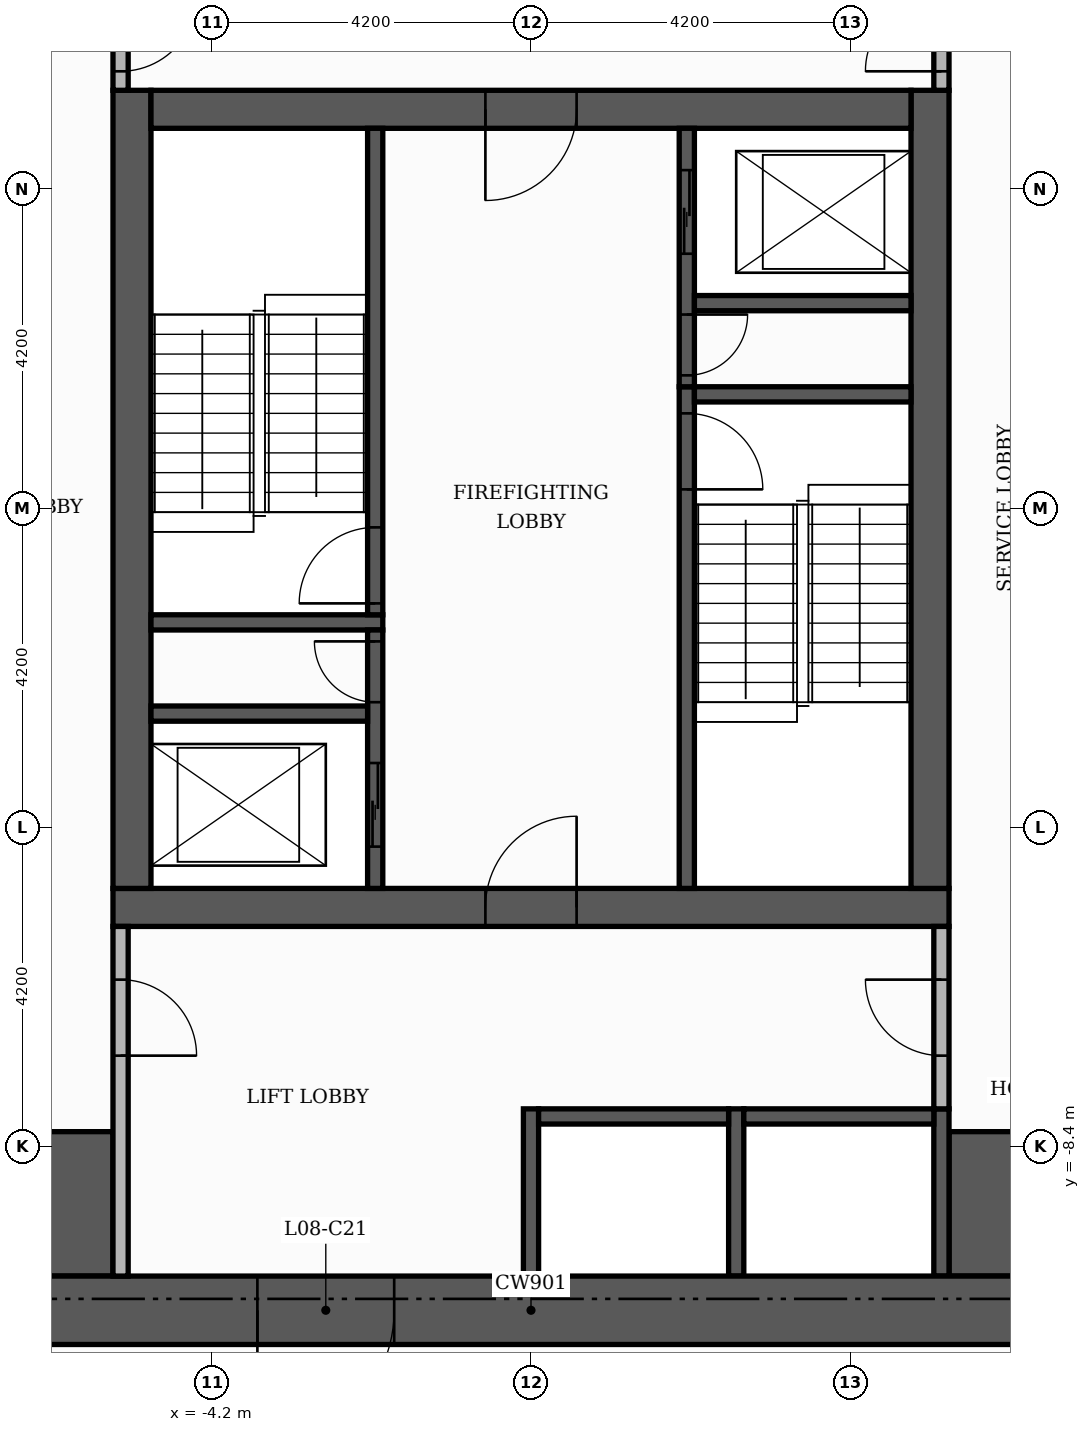
"""IFC4 building model, lengths in metres.
Left out: names, types, materials, properties, quantities, classifications, styles, units other than length and angle.
Written with IfcOpenShell. Run it as: python <this file> out.ifc"""

import sys

from ifc_helpers import new_model, si_unit, direction, frame, frame_2d, origin, place, context, subcontext, project, spatial, rectangle, extrude, element, fill, save


model = new_model("IFC4")
c1 = context("Model", 3, precision=1e-05, world=origin(), true_north=direction((0.0, 1.0)))
c2 = subcontext(c1, "Body", "Model", "MODEL_VIEW")
j1 = project(units=[si_unit("LENGTHUNIT", "METRE"), si_unit("PLANEANGLEUNIT", "RADIAN")], contexts=[c1])
p1 = place(None, origin())
s1 = spatial("IfcSite", under=j1, at=p1, CompositionType="ELEMENT")
p2 = place(p1, origin())
s2 = spatial("IfcBuilding", under=s1, at=p2, CompositionType="ELEMENT")
p3 = place(p2, frame((0.0, 0.0, 38.7)))
s3 = spatial("IfcBuildingStorey", under=s2, at=p3, CompositionType="ELEMENT", Elevation=38.7)
p4 = place(p3, frame((-5.5, -5.25, 0.0), z_axis=(0.0, 0.0, 1.0), x_axis=(1.0, 0.0, 0.0)))
e1 = element("IfcWall", 1, at=p4, inside=s3, PredefinedType="SHEAR", context=c2, shape_type="SweptSolid", body=[
    extrude(rectangle(XDim=11.0, YDim=0.5, at=frame_2d((5.5, 0.0))), origin(), (0.0, 0.0, 1.0), 3.48),
])
p5 = place(p4, frame((4.9, 0.0, 0.0)))
e2 = element("IfcOpeningElement", 2, at=p5, cuts=e1, PredefinedType="OPENING", context=c2, shape_type="SweptSolid", body=[
    extrude(rectangle(XDim=1.2, YDim=2.1, at=frame_2d((0.6, 1.05))), frame((0.0, 0.26, 0.0), z_axis=(0.0, -1.0, 0.0), x_axis=(1.0, 0.0, 0.0)), (0.0, 0.0, 1.0), 0.52),
])
for number, where, z_axis, x_axis in (
    (3, (-5.25, -5.0, 0.0), (0.0, 0.0, 1.0), (0.0, 1.0, 0.0)),
    (4, (5.25, -5.0, 0.0), (0.0, 0.0, 1.0), (0.0, 1.0, 0.0)),
):
    element("IfcWall", number, at=place(p3, frame(where, z_axis=z_axis, x_axis=x_axis)), inside=s3, PredefinedType="SHEAR", context=c2, shape_type="SweptSolid", body=[
        extrude(rectangle(XDim=10.5, YDim=0.5, at=frame_2d((5.25, 0.0))), origin(), (0.0, 0.0, 1.0), 3.48),
    ])
p6 = place(p3, frame((-5.0, 5.25, 0.0), z_axis=(0.0, 0.0, 1.0), x_axis=(1.0, 0.0, 0.0)))
e5 = element("IfcWall", 5, at=p6, inside=s3, PredefinedType="SHEAR", context=c2, shape_type="SweptSolid", body=[
    extrude(rectangle(XDim=10.0, YDim=0.5, at=frame_2d((5.0, 0.0))), origin(), (0.0, 0.0, 1.0), 3.48),
])
p7 = place(p6, frame((4.4, 0.0, 0.0)))
e6 = element("IfcOpeningElement", 6, at=p7, cuts=e5, PredefinedType="OPENING", context=c2, shape_type="SweptSolid", body=[
    extrude(rectangle(XDim=1.2, YDim=2.1, at=frame_2d((0.6, 1.05))), frame((0.0, 0.26, 0.0), z_axis=(0.0, -1.0, 0.0), x_axis=(1.0, 0.0, 0.0)), (0.0, 0.0, 1.0), 0.52),
])
for number, where, z_axis, x_axis in (
    (7, (-10.1, -9.15, 0.0), (0.0, 0.0, 1.0), (1.0, 0.0, 0.0)),
    (8, (5.5, -9.15, 0.0), (0.0, 0.0, 1.0), (1.0, 0.0, 0.0)),
):
    element("IfcWall", number, at=place(p3, frame(where, z_axis=z_axis, x_axis=x_axis)), inside=s3, PredefinedType="SHEAR", context=c2, shape_type="SweptSolid", body=[
        extrude(rectangle(XDim=4.6, YDim=1.9, at=frame_2d((2.3, 0.0))), origin(), (0.0, 0.0, 1.0), 3.48),
    ])
p8 = place(p3, frame((2.05, -5.0, 0.0), z_axis=(0.0, 0.0, 1.0), x_axis=(0.0, 1.0, 0.0)))
e9 = element("IfcWall", 9, at=p8, inside=s3, PredefinedType="SHEAR", context=c2, shape_type="SweptSolid", body=[
    extrude(rectangle(XDim=6.6, YDim=0.2, at=frame_2d((3.3, 0.0))), origin(), (0.0, 0.0, 1.0), 3.48),
])
p9 = place(p8, frame((5.25, 0.0, 0.0)))
e10 = element("IfcOpeningElement", 10, at=p9, cuts=e9, PredefinedType="OPENING", context=c2, shape_type="SweptSolid", body=[
    extrude(rectangle(XDim=1.0, YDim=2.1, at=frame_2d((0.5, 1.05))), frame((0.0, 0.11, 0.0), z_axis=(0.0, -1.0, 0.0), x_axis=(1.0, 0.0, 0.0)), (0.0, 0.0, 1.0), 0.22),
])
p10 = place(p3, frame((-5.0, -1.5, 0.0), z_axis=(0.0, 0.0, 1.0), x_axis=(1.0, 0.0, 0.0)))
e11 = element("IfcWall", 11, at=p10, inside=s3, PredefinedType="SHEAR", context=c2, shape_type="SweptSolid", body=[
    extrude(rectangle(XDim=3.05, YDim=0.2, at=frame_2d((1.525, 0.0))), origin(), (0.0, 0.0, 1.0), 3.48),
])
p11 = place(p3, frame((-2.05, -1.4, 0.0), z_axis=(0.0, 0.0, 1.0), x_axis=(0.0, 1.0, 0.0)))
e12 = element("IfcWall", 12, at=p11, inside=s3, PredefinedType="SHEAR", context=c2, shape_type="SweptSolid", body=[
    extrude(rectangle(XDim=6.4, YDim=0.2, at=frame_2d((3.2, 0.0))), origin(), (0.0, 0.0, 1.0), 3.48),
])
p12 = place(p11, frame((0.15, 0.0, 0.0)))
e13 = element("IfcOpeningElement", 13, at=p12, cuts=e12, PredefinedType="OPENING", context=c2, shape_type="SweptSolid", body=[
    extrude(rectangle(XDim=1.0, YDim=2.1, at=frame_2d((0.5, 1.05))), frame((0.0, 0.11, 0.0), z_axis=(0.0, -1.0, 0.0), x_axis=(1.0, 0.0, 0.0)), (0.0, 0.0, 1.0), 0.22),
])
p13 = place(p3, frame((2.15, 1.5, 0.0), z_axis=(0.0, 0.0, 1.0), x_axis=(1.0, 0.0, 0.0)))
e14 = element("IfcWall", 14, at=p13, inside=s3, PredefinedType="SHEAR", context=c2, shape_type="SweptSolid", body=[
    extrude(rectangle(XDim=2.85, YDim=0.2, at=frame_2d((1.425, 0.0))), origin(), (0.0, 0.0, 1.0), 3.48),
])
for number, where, z_axis, x_axis in (
    (15, (0.0, -10.1, 0.0), (0.0, 0.0, 1.0), (0.0, 1.0, 0.0)),
    (16, (2.7, -10.1, 0.0), (0.0, 0.0, 1.0), (0.0, 1.0, 0.0)),
    (17, (5.4, -10.1, 0.0), (0.0, 0.0, 1.0), (0.0, 1.0, 0.0)),
):
    element("IfcWall", number, at=place(p3, frame(where, z_axis=z_axis, x_axis=x_axis)), inside=s3, PredefinedType="SHEAR", context=c2, shape_type="SweptSolid", body=[
        extrude(rectangle(XDim=2.2, YDim=0.2, at=frame_2d((1.1, 0.0))), origin(), (0.0, 0.0, 1.0), 3.48),
    ])
for number, where, z_axis, x_axis in (
    (18, (0.1, -8.0, 0.0), (0.0, 0.0, 1.0), (1.0, 0.0, 0.0)),
    (19, (2.8, -8.0, 0.0), (0.0, 0.0, 1.0), (1.0, 0.0, 0.0)),
):
    element("IfcWall", number, at=place(p3, frame(where, z_axis=z_axis, x_axis=x_axis)), inside=s3, PredefinedType="SHEAR", context=c2, shape_type="SweptSolid", body=[
        extrude(rectangle(XDim=2.5, YDim=0.2, at=frame_2d((1.25, 0.0))), origin(), (0.0, 0.0, 1.0), 3.48),
    ])
p14 = place(p3, frame((-2.05, -5.0, 0.0), z_axis=(0.0, 0.0, 1.0), x_axis=(0.0, 1.0, 0.0)))
e20 = element("IfcWall", 20, at=p14, inside=s3, PredefinedType="SHEAR", context=c2, shape_type="SweptSolid", body=[
    extrude(rectangle(XDim=3.4, YDim=0.2, at=frame_2d((1.7, 0.0))), origin(), (0.0, 0.0, 1.0), 3.48),
])
p15 = place(p14, frame((0.55, 0.0, 0.0)))
e21 = element("IfcOpeningElement", 21, at=p15, cuts=e20, PredefinedType="OPENING", context=c2, shape_type="SweptSolid", body=[
    extrude(rectangle(XDim=1.1, YDim=2.1, at=frame_2d((0.55, 1.05))), frame((0.0, 0.11, 0.0), z_axis=(0.0, -1.0, 0.0), x_axis=(1.0, 0.0, 0.0)), (0.0, 0.0, 1.0), 0.22),
])
p16 = place(p14, frame((2.45, 0.0, 0.0)))
e22 = element("IfcOpeningElement", 22, at=p16, cuts=e20, PredefinedType="OPENING", context=c2, shape_type="SweptSolid", body=[
    extrude(rectangle(XDim=0.8, YDim=2.1, at=frame_2d((0.4, 1.05))), frame((0.0, 0.11, 0.0), z_axis=(0.0, -1.0, 0.0), x_axis=(1.0, 0.0, 0.0)), (0.0, 0.0, 1.0), 0.22),
])
p17 = place(p3, frame((-5.0, -2.7, 0.0), z_axis=(0.0, 0.0, 1.0), x_axis=(1.0, 0.0, 0.0)))
e23 = element("IfcWall", 23, at=p17, inside=s3, PredefinedType="SHEAR", context=c2, shape_type="SweptSolid", body=[
    extrude(rectangle(XDim=2.85, YDim=0.2, at=frame_2d((1.425, 0.0))), origin(), (0.0, 0.0, 1.0), 3.48),
])
p18 = place(p3, frame((2.05, 1.6, 0.0), z_axis=(0.0, 0.0, 1.0), x_axis=(0.0, 1.0, 0.0)))
e24 = element("IfcWall", 24, at=p18, inside=s3, PredefinedType="SHEAR", context=c2, shape_type="SweptSolid", body=[
    extrude(rectangle(XDim=3.4, YDim=0.2, at=frame_2d((1.7, 0.0))), origin(), (0.0, 0.0, 1.0), 3.48),
])
p19 = place(p18, frame((1.75, 0.0, 0.0)))
e25 = element("IfcOpeningElement", 25, at=p19, cuts=e24, PredefinedType="OPENING", context=c2, shape_type="SweptSolid", body=[
    extrude(rectangle(XDim=1.1, YDim=2.1, at=frame_2d((0.55, 1.05))), frame((0.0, 0.11, 0.0), z_axis=(0.0, -1.0, 0.0), x_axis=(1.0, 0.0, 0.0)), (0.0, 0.0, 1.0), 0.22),
])
p20 = place(p18, frame((0.15, 0.0, 0.0)))
e26 = element("IfcOpeningElement", 26, at=p20, cuts=e24, PredefinedType="OPENING", context=c2, shape_type="SweptSolid", body=[
    extrude(rectangle(XDim=0.8, YDim=2.1, at=frame_2d((0.4, 1.05))), frame((0.0, 0.11, 0.0), z_axis=(0.0, -1.0, 0.0), x_axis=(1.0, 0.0, 0.0)), (0.0, 0.0, 1.0), 0.22),
])
p21 = place(p3, frame((2.15, 2.7, 0.0), z_axis=(0.0, 0.0, 1.0), x_axis=(1.0, 0.0, 0.0)))
e27 = element("IfcWall", 27, at=p21, inside=s3, PredefinedType="SHEAR", context=c2, shape_type="SweptSolid", body=[
    extrude(rectangle(XDim=2.85, YDim=0.2, at=frame_2d((1.425, 0.0))), origin(), (0.0, 0.0, 1.0), 3.48),
])
p22 = place(p3, frame((-11.0, -10.55, 0.0), z_axis=(0.0, 0.0, 1.0), x_axis=(1.0, 0.0, 0.0)))
e28 = element("IfcWall", 28, at=p22, inside=s3, PredefinedType="SHEAR", context=c2, shape_type="SweptSolid", body=[
    extrude(rectangle(XDim=22.0, YDim=0.9, at=frame_2d((11.0, 0.0))), origin(), (0.0, 0.0, 1.0), 3.48),
])
p23 = place(p22, frame((7.4, 0.0, 0.0)))
e29 = element("IfcOpeningElement", 29, at=p23, cuts=e28, PredefinedType="OPENING", context=c2, shape_type="SweptSolid", body=[
    extrude(rectangle(XDim=1.8, YDim=2.2, at=frame_2d((0.9, 1.1))), frame((0.0, 0.46, 0.0), z_axis=(0.0, -1.0, 0.0), x_axis=(1.0, 0.0, 0.0)), (0.0, 0.0, 1.0), 0.92),
])
p24 = place(p3, frame((-5.4, -10.1, 0.0), z_axis=(0.0, 0.0, 1.0), x_axis=(0.0, 1.0, 0.0)))
e30 = element("IfcWall", 30, at=p24, inside=s3, PredefinedType="PARTITIONING", context=c2, shape_type="SweptSolid", body=[
    extrude(rectangle(XDim=4.6, YDim=0.2, at=frame_2d((2.3, 0.0))), origin(), (0.0, 0.0, 1.0), 3.48),
])
p25 = place(p24, frame((2.9, 0.0, 0.0)))
e31 = element("IfcOpeningElement", 31, at=p25, cuts=e30, PredefinedType="OPENING", context=c2, shape_type="SweptSolid", body=[
    extrude(rectangle(XDim=1.0, YDim=2.1, at=frame_2d((0.5, 1.05))), frame((0.0, 0.11, 0.0), z_axis=(0.0, -1.0, 0.0), x_axis=(1.0, 0.0, 0.0)), (0.0, 0.0, 1.0), 0.22),
])
p26 = place(p3, frame((5.4, -7.9, 0.0), z_axis=(0.0, 0.0, 1.0), x_axis=(0.0, 1.0, 0.0)))
e32 = element("IfcWall", 32, at=p26, inside=s3, PredefinedType="PARTITIONING", context=c2, shape_type="SweptSolid", body=[
    extrude(rectangle(XDim=2.4, YDim=0.2, at=frame_2d((1.2, 0.0))), origin(), (0.0, 0.0, 1.0), 3.48),
])
p27 = place(p26, frame((0.7, 0.0, 0.0)))
e33 = element("IfcOpeningElement", 33, at=p27, cuts=e32, PredefinedType="OPENING", context=c2, shape_type="SweptSolid", body=[
    extrude(rectangle(XDim=1.0, YDim=2.1, at=frame_2d((0.5, 1.05))), frame((0.0, 0.11, 0.0), z_axis=(0.0, -1.0, 0.0), x_axis=(1.0, 0.0, 0.0)), (0.0, 0.0, 1.0), 0.22),
])
p28 = place(p3, frame((-5.4, 5.5, 0.0), z_axis=(0.0, 0.0, 1.0), x_axis=(0.0, 1.0, 0.0)))
e34 = element("IfcWall", 34, at=p28, inside=s3, PredefinedType="PARTITIONING", context=c2, shape_type="SweptSolid", body=[
    extrude(rectangle(XDim=1.55, YDim=0.2, at=frame_2d((0.775, 0.0))), origin(), (0.0, 0.0, 1.0), 3.48),
])
p29 = place(p28, frame((0.25, 0.0, 0.0)))
e35 = element("IfcOpeningElement", 35, at=p29, cuts=e34, PredefinedType="OPENING", context=c2, shape_type="SweptSolid", body=[
    extrude(rectangle(XDim=1.0, YDim=2.1, at=frame_2d((0.5, 1.05))), frame((0.0, 0.11, 0.0), z_axis=(0.0, -1.0, 0.0), x_axis=(1.0, 0.0, 0.0)), (0.0, 0.0, 1.0), 0.22),
])
p30 = place(p3, frame((5.4, 5.5, 0.0), z_axis=(0.0, 0.0, 1.0), x_axis=(0.0, 1.0, 0.0)))
e36 = element("IfcWall", 36, at=p30, inside=s3, PredefinedType="PARTITIONING", context=c2, shape_type="SweptSolid", body=[
    extrude(rectangle(XDim=4.6, YDim=0.2, at=frame_2d((2.3, 0.0))), origin(), (0.0, 0.0, 1.0), 3.48),
])
p31 = place(p30, frame((0.25, 0.0, 0.0)))
e37 = element("IfcOpeningElement", 37, at=p31, cuts=e36, PredefinedType="OPENING", context=c2, shape_type="SweptSolid", body=[
    extrude(rectangle(XDim=1.0, YDim=2.1, at=frame_2d((0.5, 1.05))), frame((0.0, 0.11, 0.0), z_axis=(0.0, -1.0, 0.0), x_axis=(1.0, 0.0, 0.0)), (0.0, 0.0, 1.0), 0.22),
])
p32 = place(p19, origin())
e38 = element("IfcDoor", 38, at=p32, inside=s3, OperationType="SLIDING_TO_LEFT", PredefinedType="DOOR", context=c2, shape_type="SweptSolid", body=[
    extrude(rectangle(XDim=1.1, YDim=2.1, at=frame_2d((0.55, 1.05))), frame((0.0, 0.025, 0.0), z_axis=(0.0, -1.0, 0.0), x_axis=(1.0, 0.0, 0.0)), (0.0, 0.0, 1.0), 0.05),
])
fill(e25, e38)
p33 = place(p15, origin())
e39 = element("IfcDoor", 39, at=p33, inside=s3, OperationType="SLIDING_TO_LEFT", PredefinedType="DOOR", context=c2, shape_type="SweptSolid", body=[
    extrude(rectangle(XDim=1.1, YDim=2.1, at=frame_2d((0.55, 1.05))), frame((0.0, 0.025, 0.0), z_axis=(0.0, -1.0, 0.0), x_axis=(1.0, 0.0, 0.0)), (0.0, 0.0, 1.0), 0.05),
])
fill(e21, e39)
p34 = place(p12, origin())
e40 = element("IfcDoor", 40, at=p34, inside=s3, OperationType="SINGLE_SWING_LEFT", PredefinedType="DOOR", context=c2, shape_type="SweptSolid", body=[
    extrude(rectangle(XDim=1.0, YDim=2.1, at=frame_2d((0.5, 1.05))), frame((0.0, 0.025, 0.0), z_axis=(0.0, -1.0, 0.0), x_axis=(1.0, 0.0, 0.0)), (0.0, 0.0, 1.0), 0.05),
])
fill(e13, e40)
p35 = place(p9, frame((1.0, 0.0, 0.0), z_axis=(0.0, 0.0, 1.0), x_axis=(-1.0, 0.0, 0.0)))
e41 = element("IfcDoor", 41, at=p35, inside=s3, OperationType="SINGLE_SWING_LEFT", PredefinedType="DOOR", context=c2, shape_type="SweptSolid", body=[
    extrude(rectangle(XDim=1.0, YDim=2.1, at=frame_2d((0.5, 1.05))), frame((0.0, 0.025, 0.0), z_axis=(0.0, -1.0, 0.0), x_axis=(1.0, 0.0, 0.0)), (0.0, 0.0, 1.0), 0.05),
])
fill(e10, e41)
p36 = place(p20, frame((0.8, 0.0, 0.0), z_axis=(0.0, 0.0, 1.0), x_axis=(-1.0, 0.0, 0.0)))
e42 = element("IfcDoor", 42, at=p36, inside=s3, OperationType="SINGLE_SWING_RIGHT", PredefinedType="DOOR", context=c2, shape_type="SweptSolid", body=[
    extrude(rectangle(XDim=0.8, YDim=2.1, at=frame_2d((0.4, 1.05))), frame((0.0, 0.025, 0.0), z_axis=(0.0, -1.0, 0.0), x_axis=(1.0, 0.0, 0.0)), (0.0, 0.0, 1.0), 0.05),
])
fill(e26, e42)
p37 = place(p16, origin())
e43 = element("IfcDoor", 43, at=p37, inside=s3, OperationType="SINGLE_SWING_RIGHT", PredefinedType="DOOR", context=c2, shape_type="SweptSolid", body=[
    extrude(rectangle(XDim=0.8, YDim=2.1, at=frame_2d((0.4, 1.05))), frame((0.0, 0.025, 0.0), z_axis=(0.0, -1.0, 0.0), x_axis=(1.0, 0.0, 0.0)), (0.0, 0.0, 1.0), 0.05),
])
fill(e22, e43)
p38 = place(p7, frame((1.2, 0.0, 0.0), z_axis=(0.0, 0.0, 1.0), x_axis=(-1.0, 0.0, 0.0)))
e44 = element("IfcDoor", 44, at=p38, inside=s3, OperationType="SINGLE_SWING_LEFT", PredefinedType="DOOR", context=c2, shape_type="SweptSolid", body=[
    extrude(rectangle(XDim=1.2, YDim=2.1, at=frame_2d((0.6, 1.05))), frame((0.0, 0.025, 0.0), z_axis=(0.0, -1.0, 0.0), x_axis=(1.0, 0.0, 0.0)), (0.0, 0.0, 1.0), 0.05),
])
fill(e6, e44)
p39 = place(p5, origin())
e45 = element("IfcDoor", 45, at=p39, inside=s3, OperationType="SINGLE_SWING_RIGHT", PredefinedType="DOOR", context=c2, shape_type="SweptSolid", body=[
    extrude(rectangle(XDim=1.2, YDim=2.1, at=frame_2d((0.6, 1.05))), frame((0.0, 0.025, 0.0), z_axis=(0.0, -1.0, 0.0), x_axis=(1.0, 0.0, 0.0)), (0.0, 0.0, 1.0), 0.05),
])
fill(e2, e45)
p40 = place(p29, frame((1.0, 0.0, 0.0), z_axis=(0.0, 0.0, 1.0), x_axis=(-1.0, 0.0, 0.0)))
e46 = element("IfcDoor", 46, at=p40, inside=s3, OperationType="SINGLE_SWING_RIGHT", PredefinedType="DOOR", context=c2, shape_type="SweptSolid", body=[
    extrude(rectangle(XDim=1.0, YDim=2.1, at=frame_2d((0.5, 1.05))), frame((0.0, 0.025, 0.0), z_axis=(0.0, -1.0, 0.0), x_axis=(1.0, 0.0, 0.0)), (0.0, 0.0, 1.0), 0.05),
])
fill(e35, e46)
p41 = place(p31, origin())
e47 = element("IfcDoor", 47, at=p41, inside=s3, OperationType="SINGLE_SWING_LEFT", PredefinedType="DOOR", context=c2, shape_type="SweptSolid", body=[
    extrude(rectangle(XDim=1.0, YDim=2.1, at=frame_2d((0.5, 1.05))), frame((0.0, 0.025, 0.0), z_axis=(0.0, -1.0, 0.0), x_axis=(1.0, 0.0, 0.0)), (0.0, 0.0, 1.0), 0.05),
])
fill(e37, e47)
p42 = place(p25, frame((1.0, 0.0, 0.0), z_axis=(0.0, 0.0, 1.0), x_axis=(-1.0, 0.0, 0.0)))
e48 = element("IfcDoor", 48, at=p42, inside=s3, OperationType="SINGLE_SWING_LEFT", PredefinedType="DOOR", context=c2, shape_type="SweptSolid", body=[
    extrude(rectangle(XDim=1.0, YDim=2.1, at=frame_2d((0.5, 1.05))), frame((0.0, 0.025, 0.0), z_axis=(0.0, -1.0, 0.0), x_axis=(1.0, 0.0, 0.0)), (0.0, 0.0, 1.0), 0.05),
])
fill(e31, e48)
p43 = place(p27, origin())
e49 = element("IfcDoor", 49, at=p43, inside=s3, OperationType="SINGLE_SWING_RIGHT", PredefinedType="DOOR", context=c2, shape_type="SweptSolid", body=[
    extrude(rectangle(XDim=1.0, YDim=2.1, at=frame_2d((0.5, 1.05))), frame((0.0, 0.025, 0.0), z_axis=(0.0, -1.0, 0.0), x_axis=(1.0, 0.0, 0.0)), (0.0, 0.0, 1.0), 0.05),
])
fill(e33, e49)
p44 = place(p23, frame((1.8, 0.0, 0.0), z_axis=(0.0, 0.0, 1.0), x_axis=(-1.0, 0.0, 0.0)))
e50 = element("IfcDoor", 50, at=p44, inside=s3, OperationType="DOUBLE_DOOR_SINGLE_SWING", PredefinedType="DOOR", context=c2, shape_type="SweptSolid", body=[
    extrude(rectangle(XDim=1.8, YDim=2.2, at=frame_2d((0.9, 1.1))), frame((0.0, 0.025, 0.0), z_axis=(0.0, -1.0, 0.0), x_axis=(1.0, 0.0, 0.0)), (0.0, 0.0, 1.0), 0.05),
])
fill(e29, e50)
save(model, sys.argv[1])
